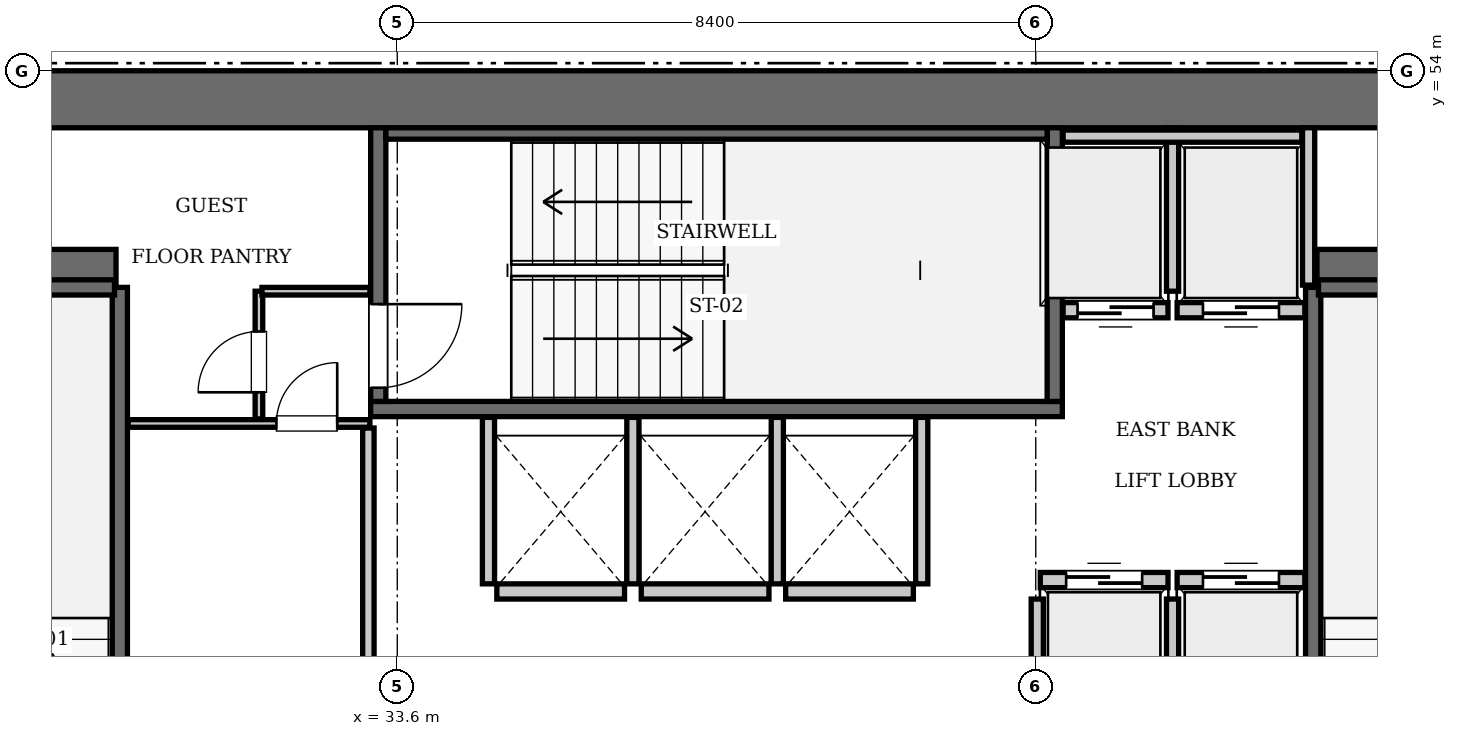
"""IFC4 building model, lengths in metres.
Left out: names, types, materials, properties, quantities, classifications, styles, units other than length and angle.
Written with IfcOpenShell. Run it as: python <this file> out.ifc"""

import sys

from ifc_helpers import new_model, si_unit, direction, frame, frame_2d, origin, place, context, subcontext, project, spatial, rectangle, extrude, element, fill, save


model = new_model("IFC4")
c1 = context("Model", 3, precision=1e-05, world=origin(), true_north=direction((0.0, 1.0)))
c2 = subcontext(c1, "Body", "Model", "MODEL_VIEW")
j1 = project(units=[si_unit("LENGTHUNIT", "METRE"), si_unit("PLANEANGLEUNIT", "RADIAN")], contexts=[c1])
p1 = place(None, origin())
s1 = spatial("IfcSite", under=j1, at=p1, CompositionType="ELEMENT")
p2 = place(p1, origin())
s2 = spatial("IfcBuilding", under=s1, at=p2, CompositionType="ELEMENT")
p3 = place(p2, frame((0.0, 0.0, 223.65)))
s3 = spatial("IfcBuildingStorey", under=s2, at=p3, CompositionType="ELEMENT", Elevation=223.65)
p4 = place(p3, frame((25.2, 53.625, 0.0), z_axis=(0.0, 0.0, 1.0), x_axis=(1.0, 0.0, 0.0)))
e1 = element("IfcWall", 1, at=p4, inside=s3, PredefinedType="SHEAR", context=c2, shape_type="SweptSolid", body=[
    extrude(rectangle(XDim=25.2, YDim=0.75, at=frame_2d((12.6, 0.0))), origin(), (0.0, 0.0, 1.0), 3.85),
])
for number, where, z_axis, x_axis in (
    (2, (25.95, 51.4, 0.0), (0.0, 0.0, 1.0), (1.0, 0.0, 0.0)),
    (3, (45.7, 51.4, 0.0), (0.0, 0.0, 1.0), (1.0, 0.0, 0.0)),
):
    element("IfcWall", number, at=place(p3, frame(where, z_axis=z_axis, x_axis=x_axis)), inside=s3, PredefinedType="SHEAR", context=c2, shape_type="SweptSolid", body=[
        extrude(rectangle(XDim=3.95, YDim=0.5, at=frame_2d((1.975, 0.0))), origin(), (0.0, 0.0, 1.0), 3.85),
    ])
p5 = place(p3, frame((29.95, 42.15, 0.0), z_axis=(0.0, 0.0, 1.0), x_axis=(0.0, 1.0, 0.0)))
e4 = element("IfcWall", 4, at=p5, inside=s3, PredefinedType="SOLIDWALL", context=c2, shape_type="SweptSolid", body=[
    extrude(rectangle(XDim=9.0, YDim=0.2, at=frame_2d((4.5, 0.0))), origin(), (0.0, 0.0, 1.0), 3.55),
])
p6 = place(p3, frame((26.38, 51.15, 0.0), z_axis=(0.0, 0.0, 1.0), x_axis=(1.0, 0.0, 0.0)))
e5 = element("IfcWall", 5, at=p6, inside=s3, PredefinedType="SOLIDWALL", context=c2, shape_type="SweptSolid", body=[
    extrude(rectangle(XDim=3.5, YDim=0.2, at=frame_2d((1.75, 0.0))), origin(), (0.0, 0.0, 1.0), 3.55),
])
p7 = place(p3, frame((33.25, 49.55, 0.0), z_axis=(0.0, 0.0, 1.0), x_axis=(1.0, 0.0, 0.0)))
e6 = element("IfcWall", 6, at=p7, inside=s3, PredefinedType="SOLIDWALL", context=c2, shape_type="SweptSolid", body=[
    extrude(rectangle(XDim=9.1, YDim=0.2, at=frame_2d((4.55, 0.0))), origin(), (0.0, 0.0, 1.0), 3.55),
])
p8 = place(p3, frame((42.25, 49.65, 0.0), z_axis=(0.0, 0.0, 1.0), x_axis=(0.0, 1.0, 0.0)))
e7 = element("IfcWall", 7, at=p8, inside=s3, PredefinedType="SOLIDWALL", context=c2, shape_type="SweptSolid", body=[
    extrude(rectangle(XDim=3.6, YDim=0.2, at=frame_2d((1.8, 0.0))), origin(), (0.0, 0.0, 1.0), 3.55),
])
p9 = place(p3, frame((33.35, 49.65, 0.0), z_axis=(0.0, 0.0, 1.0), x_axis=(0.0, 1.0, 0.0)))
e8 = element("IfcWall", 8, at=p9, inside=s3, PredefinedType="SOLIDWALL", context=c2, shape_type="SweptSolid", body=[
    extrude(rectangle(XDim=3.6, YDim=0.2, at=frame_2d((1.8, 0.0))), origin(), (0.0, 0.0, 1.0), 3.55),
])
p10 = place(p9, frame((0.18, 0.0, 0.0)))
e9 = element("IfcOpeningElement", 9, at=p10, cuts=e8, PredefinedType="OPENING", context=c2, shape_type="SweptSolid", body=[
    extrude(rectangle(XDim=1.1, YDim=2.15, at=frame_2d((0.55, 1.075))), frame((0.0, 0.11, 0.0), z_axis=(0.0, -1.0, 0.0), x_axis=(1.0, 0.0, 0.0)), (0.0, 0.0, 1.0), 0.22),
])
p11 = place(p3, frame((33.45, 53.175, 0.0), z_axis=(0.0, 0.0, 1.0), x_axis=(1.0, 0.0, 0.0)))
e10 = element("IfcWall", 10, at=p11, inside=s3, PredefinedType="SOLIDWALL", context=c2, shape_type="SweptSolid", body=[
    extrude(rectangle(XDim=8.7, YDim=0.15, at=frame_2d((4.35, 0.0))), origin(), (0.0, 0.0, 1.0), 3.55),
])
p12 = place(p3, frame((45.65, 42.15, 0.0), z_axis=(0.0, 0.0, 1.0), x_axis=(0.0, 1.0, 0.0)))
e11 = element("IfcWall", 11, at=p12, inside=s3, PredefinedType="SOLIDWALL", context=c2, shape_type="SweptSolid", body=[
    extrude(rectangle(XDim=9.0, YDim=0.2, at=frame_2d((4.5, 0.0))), origin(), (0.0, 0.0, 1.0), 3.55),
])
p13 = place(p3, frame((45.72, 51.15, 0.0), z_axis=(0.0, 0.0, 1.0), x_axis=(1.0, 0.0, 0.0)))
e12 = element("IfcWall", 12, at=p13, inside=s3, PredefinedType="SOLIDWALL", context=c2, shape_type="SweptSolid", body=[
    extrude(rectangle(XDim=3.5, YDim=0.2, at=frame_2d((1.75, 0.0))), origin(), (0.0, 0.0, 1.0), 3.55),
])
p14 = place(p3, frame((42.06, 47.3, 0.0), z_axis=(0.0, 0.0, 1.0), x_axis=(1.0, 0.0, 0.0)))
e13 = element("IfcWall", 13, at=p14, inside=s3, PredefinedType="SOLIDWALL", context=c2, shape_type="SweptSolid", body=[
    extrude(rectangle(XDim=1.68, YDim=0.2, at=frame_2d((0.84, 0.0))), origin(), (0.0, 0.0, 1.0), 3.55),
])
p15 = place(p14, frame((0.34, 0.0, 0.0)))
e14 = element("IfcOpeningElement", 14, at=p15, cuts=e13, PredefinedType="OPENING", context=c2, shape_type="SweptSolid", body=[
    extrude(rectangle(XDim=1.0, YDim=2.15, at=frame_2d((0.5, 1.075))), frame((0.0, 0.11, 0.0), z_axis=(0.0, -1.0, 0.0), x_axis=(1.0, 0.0, 0.0)), (0.0, 0.0, 1.0), 0.22),
])
p16 = place(p3, frame((43.86, 47.3, 0.0), z_axis=(0.0, 0.0, 1.0), x_axis=(1.0, 0.0, 0.0)))
e15 = element("IfcWall", 15, at=p16, inside=s3, PredefinedType="SOLIDWALL", context=c2, shape_type="SweptSolid", body=[
    extrude(rectangle(XDim=1.68, YDim=0.2, at=frame_2d((0.84, 0.0))), origin(), (0.0, 0.0, 1.0), 3.55),
])
p17 = place(p16, frame((0.34, 0.0, 0.0)))
e16 = element("IfcOpeningElement", 16, at=p17, cuts=e15, PredefinedType="OPENING", context=c2, shape_type="SweptSolid", body=[
    extrude(rectangle(XDim=1.0, YDim=2.15, at=frame_2d((0.5, 1.075))), frame((0.0, 0.11, 0.0), z_axis=(0.0, -1.0, 0.0), x_axis=(1.0, 0.0, 0.0)), (0.0, 0.0, 1.0), 0.22),
])
p18 = place(p3, frame((42.36, 50.85, 0.0), z_axis=(0.0, 0.0, 1.0), x_axis=(1.0, 0.0, 0.0)))
e17 = element("IfcWall", 17, at=p18, inside=s3, PredefinedType="SOLIDWALL", context=c2, shape_type="SweptSolid", body=[
    extrude(rectangle(XDim=1.38, YDim=0.2, at=frame_2d((0.69, 0.0))), origin(), (0.0, 0.0, 1.0), 3.55),
])
p19 = place(p18, frame((0.19, 0.0, 0.0)))
e18 = element("IfcOpeningElement", 18, at=p19, cuts=e17, PredefinedType="OPENING", context=c2, shape_type="SweptSolid", body=[
    extrude(rectangle(XDim=1.0, YDim=2.15, at=frame_2d((0.5, 1.075))), frame((0.0, 0.11, 0.0), z_axis=(0.0, -1.0, 0.0), x_axis=(1.0, 0.0, 0.0)), (0.0, 0.0, 1.0), 0.22),
])
p20 = place(p3, frame((43.86, 50.85, 0.0), z_axis=(0.0, 0.0, 1.0), x_axis=(1.0, 0.0, 0.0)))
e19 = element("IfcWall", 19, at=p20, inside=s3, PredefinedType="SOLIDWALL", context=c2, shape_type="SweptSolid", body=[
    extrude(rectangle(XDim=1.68, YDim=0.2, at=frame_2d((0.84, 0.0))), origin(), (0.0, 0.0, 1.0), 3.55),
])
p21 = place(p20, frame((0.34, 0.0, 0.0)))
e20 = element("IfcOpeningElement", 20, at=p21, cuts=e19, PredefinedType="OPENING", context=c2, shape_type="SweptSolid", body=[
    extrude(rectangle(XDim=1.0, YDim=2.15, at=frame_2d((0.5, 1.075))), frame((0.0, 0.11, 0.0), z_axis=(0.0, -1.0, 0.0), x_axis=(1.0, 0.0, 0.0)), (0.0, 0.0, 1.0), 0.22),
])
p22 = place(p3, frame((34.91, 47.15, 0.0), z_axis=(0.0, 0.0, 1.0), x_axis=(1.0, 0.0, 0.0)))
e21 = element("IfcWall", 21, at=p22, inside=s3, PredefinedType="SOLIDWALL", context=c2, shape_type="SweptSolid", body=[
    extrude(rectangle(XDim=1.68, YDim=0.2, at=frame_2d((0.84, 0.0))), origin(), (0.0, 0.0, 1.0), 3.55),
])
for number, where, z_axis, x_axis in (
    (22, (36.81, 47.15, 0.0), (0.0, 0.0, 1.0), (1.0, 0.0, 0.0)),
    (23, (38.71, 47.15, 0.0), (0.0, 0.0, 1.0), (1.0, 0.0, 0.0)),
):
    element("IfcWall", number, at=place(p3, frame(where, z_axis=z_axis, x_axis=x_axis)), inside=s3, PredefinedType="SOLIDWALL", context=c2, shape_type="SweptSolid", body=[
        extrude(rectangle(XDim=1.68, YDim=0.2, at=frame_2d((0.84, 0.0))), origin(), (0.0, 0.0, 1.0), 3.55),
    ])
for number, where, z_axis, x_axis in (
    (24, (42.02, 45.1, 0.0), (0.0, 0.0, 1.0), (0.0, 1.0, 0.0)),
    (25, (43.8, 45.1, 0.0), (0.0, 0.0, 1.0), (0.0, 1.0, 0.0)),
):
    element("IfcWall", number, at=place(p3, frame(where, z_axis=z_axis, x_axis=x_axis)), inside=s3, PredefinedType="SOLIDWALL", context=c2, shape_type="SweptSolid", body=[
        extrude(rectangle(XDim=1.95, YDim=0.16, at=frame_2d((0.975, 0.0))), origin(), (0.0, 0.0, 1.0), 3.55),
    ])
p23 = place(p3, frame((45.59, 51.18, 0.0), z_axis=(0.0, 0.0, 1.0), x_axis=(0.0, 1.0, 0.0)))
e26 = element("IfcWall", 26, at=p23, inside=s3, PredefinedType="SOLIDWALL", context=c2, shape_type="SweptSolid", body=[
    extrude(rectangle(XDim=2.07, YDim=0.16, at=frame_2d((1.035, 0.0))), origin(), (0.0, 0.0, 1.0), 3.55),
])
p24 = place(p3, frame((43.8, 51.1, 0.0), z_axis=(0.0, 0.0, 1.0), x_axis=(0.0, 1.0, 0.0)))
e27 = element("IfcWall", 27, at=p24, inside=s3, PredefinedType="SOLIDWALL", context=c2, shape_type="SweptSolid", body=[
    extrude(rectangle(XDim=2.15, YDim=0.16, at=frame_2d((1.075, 0.0))), origin(), (0.0, 0.0, 1.0), 3.55),
])
p25 = place(p3, frame((42.36, 53.14, 0.0), z_axis=(0.0, 0.0, 1.0), x_axis=(1.0, 0.0, 0.0)))
e28 = element("IfcWall", 28, at=p25, inside=s3, PredefinedType="SOLIDWALL", context=c2, shape_type="SweptSolid", body=[
    extrude(rectangle(XDim=3.14, YDim=0.16, at=frame_2d((1.57, 0.0))), origin(), (0.0, 0.0, 1.0), 3.55),
])
for number, where, z_axis, x_axis in (
    (29, (34.8, 47.25, 0.0), (0.0, 0.0, 1.0), (0.0, 1.0, 0.0)),
    (30, (36.7, 47.25, 0.0), (0.0, 0.0, 1.0), (0.0, 1.0, 0.0)),
    (31, (38.6, 47.25, 0.0), (0.0, 0.0, 1.0), (0.0, 1.0, 0.0)),
    (32, (40.5, 47.25, 0.0), (0.0, 0.0, 1.0), (0.0, 1.0, 0.0)),
):
    element("IfcWall", number, at=place(p3, frame(where, z_axis=z_axis, x_axis=x_axis)), inside=s3, PredefinedType="SOLIDWALL", context=c2, shape_type="SweptSolid", body=[
        extrude(rectangle(XDim=2.19, YDim=0.16, at=frame_2d((1.095, 0.0))), origin(), (0.0, 0.0, 1.0), 3.55),
    ])
p26 = place(p3, frame((33.22, 45.14, 0.0), z_axis=(0.0, 0.0, 1.0), x_axis=(0.0, 1.0, 0.0)))
e33 = element("IfcWall", 33, at=p26, inside=s3, PredefinedType="PARTITIONING", context=c2, shape_type="SweptSolid", body=[
    extrude(rectangle(XDim=4.16, YDim=0.15, at=frame_2d((2.08, 0.0))), origin(), (0.0, 0.0, 1.0), 3.55),
])
p27 = place(p3, frame((30.06, 49.36, 0.0), z_axis=(0.0, 0.0, 1.0), x_axis=(1.0, 0.0, 0.0)))
e34 = element("IfcWall", 34, at=p27, inside=s3, PredefinedType="PARTITIONING", context=c2, shape_type="SweptSolid", body=[
    extrude(rectangle(XDim=3.18, YDim=0.1, at=frame_2d((1.59, 0.0))), origin(), (0.0, 0.0, 1.0), 3.55),
])
p28 = place(p27, frame((1.95, 0.0, 0.0)))
e35 = element("IfcOpeningElement", 35, at=p28, cuts=e34, PredefinedType="OPENING", context=c2, shape_type="SweptSolid", body=[
    extrude(rectangle(XDim=0.8, YDim=2.05, at=frame_2d((0.4, 1.025))), frame((0.0, 0.06, 0.0), z_axis=(0.0, -1.0, 0.0), x_axis=(1.0, 0.0, 0.0)), (0.0, 0.0, 1.0), 0.12),
])
p29 = place(p3, frame((31.78, 49.42, 0.0), z_axis=(0.0, 0.0, 1.0), x_axis=(0.0, 1.0, 0.0)))
e36 = element("IfcWall", 36, at=p29, inside=s3, PredefinedType="PARTITIONING", context=c2, shape_type="SweptSolid", body=[
    extrude(rectangle(XDim=1.68, YDim=0.1, at=frame_2d((0.84, 0.0))), origin(), (0.0, 0.0, 1.0), 3.55),
])
p30 = place(p29, frame((0.35, 0.0, 0.0)))
e37 = element("IfcOpeningElement", 37, at=p30, cuts=e36, PredefinedType="OPENING", context=c2, shape_type="SweptSolid", body=[
    extrude(rectangle(XDim=0.8, YDim=2.05, at=frame_2d((0.4, 1.025))), frame((0.0, 0.06, 0.0), z_axis=(0.0, -1.0, 0.0), x_axis=(1.0, 0.0, 0.0)), (0.0, 0.0, 1.0), 0.12),
])
p31 = place(p3, frame((31.82, 51.1, 0.0), z_axis=(0.0, 0.0, 1.0), x_axis=(1.0, 0.0, 0.0)))
e38 = element("IfcWall", 38, at=p31, inside=s3, PredefinedType="PARTITIONING", context=c2, shape_type="SweptSolid", body=[
    extrude(rectangle(XDim=1.42, YDim=0.1, at=frame_2d((0.71, 0.0))), origin(), (0.0, 0.0, 1.0), 3.55),
])
p32 = place(p10, frame((1.1, 0.0, 0.0), z_axis=(0.0, 0.0, 1.0), x_axis=(-1.0, 0.0, 0.0)))
e39 = element("IfcDoor", 39, at=p32, inside=s3, OperationType="SINGLE_SWING_LEFT", PredefinedType="DOOR", context=c2, shape_type="SweptSolid", body=[
    extrude(rectangle(XDim=1.1, YDim=2.15, at=frame_2d((0.55, 1.075))), frame((0.0, 0.025, 0.0), z_axis=(0.0, -1.0, 0.0), x_axis=(1.0, 0.0, 0.0)), (0.0, 0.0, 1.0), 0.05),
])
fill(e9, e39)
p33 = place(p15, origin())
e40 = element("IfcDoor", 40, at=p33, inside=s3, OperationType="SLIDING_TO_LEFT", PredefinedType="DOOR", context=c2, shape_type="SweptSolid", body=[
    extrude(rectangle(XDim=1.0, YDim=2.15, at=frame_2d((0.5, 1.075))), frame((0.0, 0.025, 0.0), z_axis=(0.0, -1.0, 0.0), x_axis=(1.0, 0.0, 0.0)), (0.0, 0.0, 1.0), 0.05),
])
fill(e14, e40)
p34 = place(p17, origin())
e41 = element("IfcDoor", 41, at=p34, inside=s3, OperationType="SLIDING_TO_LEFT", PredefinedType="DOOR", context=c2, shape_type="SweptSolid", body=[
    extrude(rectangle(XDim=1.0, YDim=2.15, at=frame_2d((0.5, 1.075))), frame((0.0, 0.025, 0.0), z_axis=(0.0, -1.0, 0.0), x_axis=(1.0, 0.0, 0.0)), (0.0, 0.0, 1.0), 0.05),
])
fill(e16, e41)
p35 = place(p19, frame((1.0, 0.0, 0.0), z_axis=(0.0, 0.0, 1.0), x_axis=(-1.0, 0.0, 0.0)))
e42 = element("IfcDoor", 42, at=p35, inside=s3, OperationType="SLIDING_TO_LEFT", PredefinedType="DOOR", context=c2, shape_type="SweptSolid", body=[
    extrude(rectangle(XDim=1.0, YDim=2.15, at=frame_2d((0.5, 1.075))), frame((0.0, 0.025, 0.0), z_axis=(0.0, -1.0, 0.0), x_axis=(1.0, 0.0, 0.0)), (0.0, 0.0, 1.0), 0.05),
])
fill(e18, e42)
p36 = place(p21, frame((1.0, 0.0, 0.0), z_axis=(0.0, 0.0, 1.0), x_axis=(-1.0, 0.0, 0.0)))
e43 = element("IfcDoor", 43, at=p36, inside=s3, OperationType="SLIDING_TO_LEFT", PredefinedType="DOOR", context=c2, shape_type="SweptSolid", body=[
    extrude(rectangle(XDim=1.0, YDim=2.15, at=frame_2d((0.5, 1.075))), frame((0.0, 0.025, 0.0), z_axis=(0.0, -1.0, 0.0), x_axis=(1.0, 0.0, 0.0)), (0.0, 0.0, 1.0), 0.05),
])
fill(e20, e43)
p37 = place(p28, origin())
e44 = element("IfcDoor", 44, at=p37, inside=s3, OperationType="SINGLE_SWING_RIGHT", PredefinedType="DOOR", context=c2, shape_type="SweptSolid", body=[
    extrude(rectangle(XDim=0.8, YDim=2.05, at=frame_2d((0.4, 1.025))), frame((0.0, 0.025, 0.0), z_axis=(0.0, -1.0, 0.0), x_axis=(1.0, 0.0, 0.0)), (0.0, 0.0, 1.0), 0.05),
])
fill(e35, e44)
p38 = place(p30, origin())
e45 = element("IfcDoor", 45, at=p38, inside=s3, OperationType="SINGLE_SWING_LEFT", PredefinedType="DOOR", context=c2, shape_type="SweptSolid", body=[
    extrude(rectangle(XDim=0.8, YDim=2.05, at=frame_2d((0.4, 1.025))), frame((0.0, 0.025, 0.0), z_axis=(0.0, -1.0, 0.0), x_axis=(1.0, 0.0, 0.0)), (0.0, 0.0, 1.0), 0.05),
])
fill(e37, e45)
save(model, sys.argv[1])
